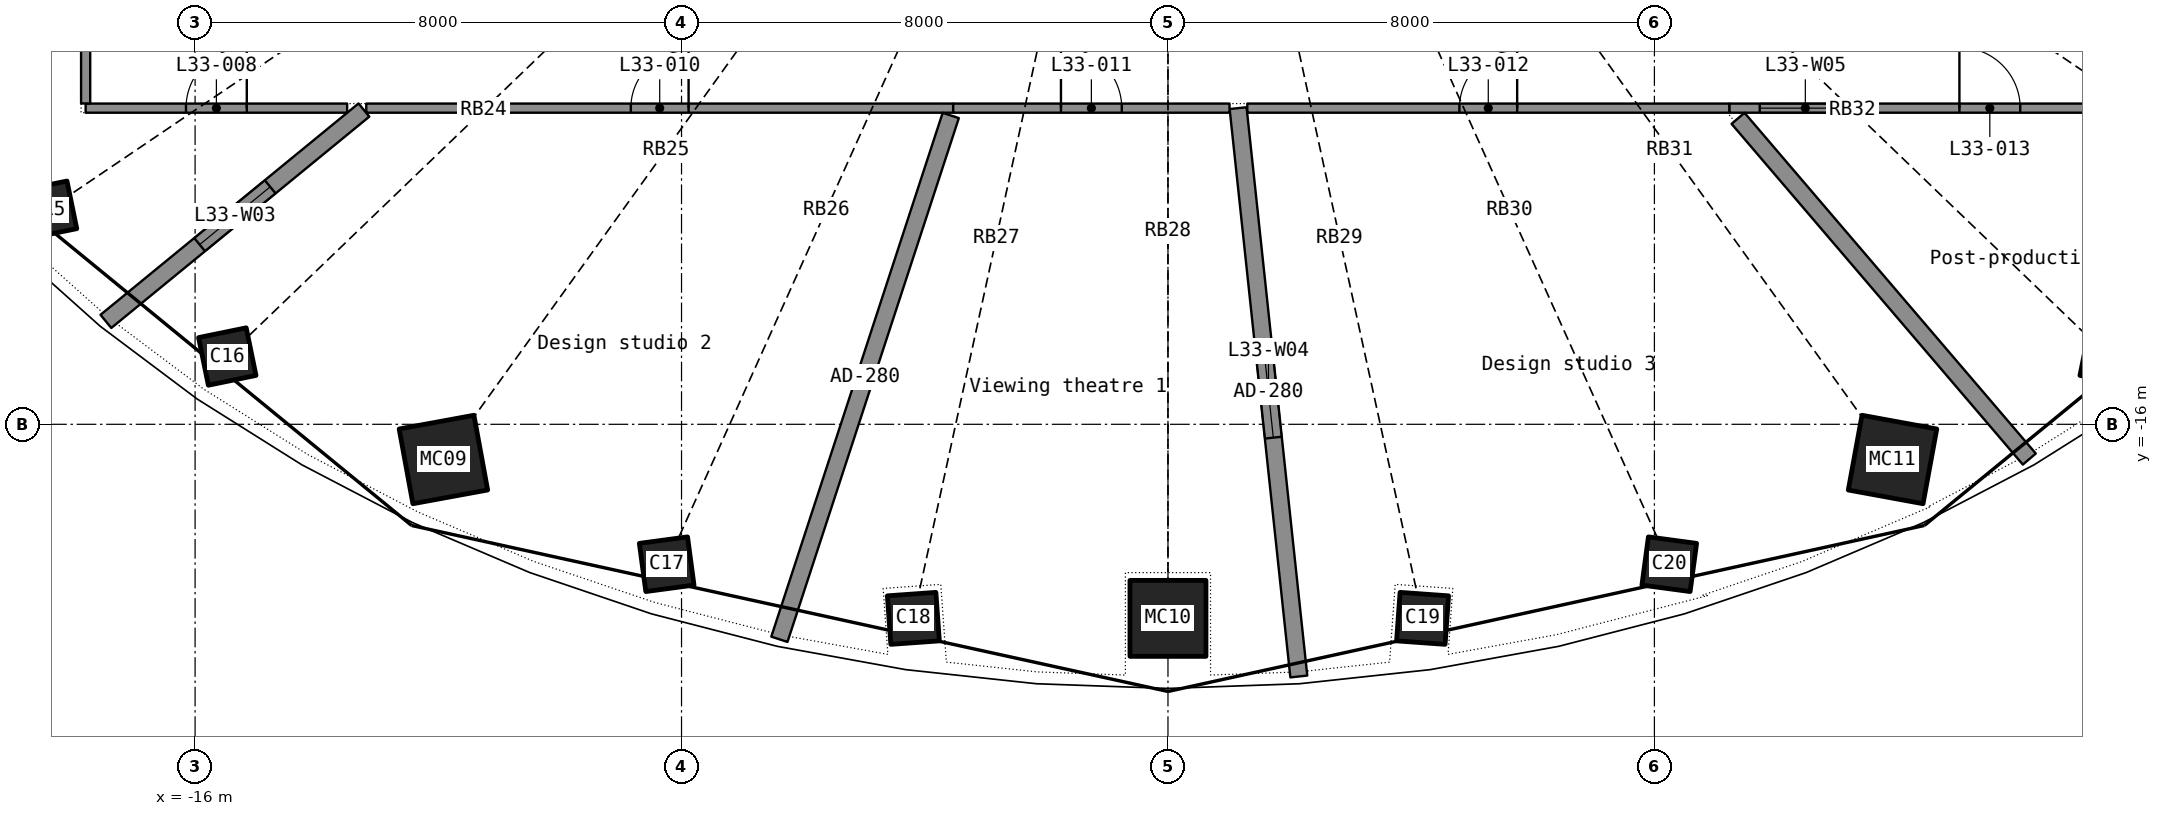
"""IFC4 building model, lengths in metres.
Left out: names, types, materials, properties, quantities, classifications, styles, units other than length and angle.
Written with IfcOpenShell. Run it as: python <this file> out.ifc"""

import sys

from ifc_helpers import new_model, si_unit, direction, frame, frame_2d, origin, origin_2d, place, context, subcontext, project, spatial, rectangle, hollow_rectangle, extrude, element, fill, save


model = new_model("IFC4")
c1 = context("Model", 3, precision=1e-05, world=origin(), true_north=direction((0.0, 1.0)))
c2 = subcontext(c1, "Body", "Model", "MODEL_VIEW")
j1 = project(units=[si_unit("LENGTHUNIT", "METRE"), si_unit("PLANEANGLEUNIT", "RADIAN")], contexts=[c1])
p1 = place(None, origin())
s1 = spatial("IfcSite", under=j1, at=p1, CompositionType="ELEMENT")
p2 = place(p1, origin())
s2 = spatial("IfcBuilding", under=s1, at=p2, CompositionType="ELEMENT")
p3 = place(p2, frame((0.0, 0.0, 137.8)))
s3 = spatial("IfcBuildingStorey", under=s2, at=p3, CompositionType="ELEMENT", Elevation=137.8)
p4 = place(p3, frame((-18.418, -12.471, 0.0), z_axis=(0.026446242, 0.018268352, 0.999483298), x_axis=(-0.721972796, 0.691891312, 0.00645709)))
e1 = element("IfcColumn", 1, at=p4, inside=s3, PredefinedType="COLUMN", context=c2, shape_type="SweptSolid", body=[
    extrude(hollow_rectangle(XDim=0.8, YDim=0.8, WallThickness=0.025, at=origin_2d()), origin(), (0.0, 0.0, 1.0), 3.702),
])
p5 = place(p3, frame((-15.471, -14.885, 0.0), z_axis=(0.022292076, 0.0216985, 0.999516002), x_axis=(-0.827314223, 0.561704567, 0.006257434)))
e2 = element("IfcColumn", 2, at=p5, inside=s3, PredefinedType="COLUMN", context=c2, shape_type="SweptSolid", body=[
    extrude(hollow_rectangle(XDim=0.8, YDim=0.8, WallThickness=0.025, at=origin_2d()), origin(), (0.0, 0.0, 1.0), 3.702),
])
p6 = place(p3, frame((-11.916, -16.579, 0.0), z_axis=(0.017280237, 0.024535299, 0.999549605), x_axis=(-0.908022718, 0.418885919, 0.005415796)))
e3 = element("IfcColumn", 3, at=p6, inside=s3, PredefinedType="COLUMN", context=c2, shape_type="SweptSolid", body=[
    extrude(hollow_rectangle(XDim=1.25, YDim=1.25, WallThickness=0.032, at=origin_2d()), origin(), (0.0, 0.0, 1.0), 3.702),
])
for number, where, z_axis, x_axis in (
    (4, (-8.244, -18.302, 0.0), (0.012, 0.027, 1.0), (-0.959, 0.282, 0.004)),
    (5, (-4.188, -19.192, 0.0), (0.006, 0.028, 1.0), (-0.99, 0.14, 0.002)),
):
    element("IfcColumn", number, at=place(p3, frame(where, z_axis=z_axis, x_axis=x_axis)), inside=s3, PredefinedType="COLUMN", context=c2, shape_type="SweptSolid", body=[
        extrude(hollow_rectangle(XDim=0.8, YDim=0.8, WallThickness=0.025, at=origin_2d()), origin(), (0.0, 0.0, 1.0), 3.701),
    ])
p7 = place(p3, frame((0.0, -19.192, 0.0), z_axis=(0.0, 0.02836206, 0.999597716), x_axis=(-1.0, 0.0, 0.0)))
e6 = element("IfcColumn", 6, at=p7, inside=s3, PredefinedType="COLUMN", context=c2, shape_type="SweptSolid", body=[
    extrude(hollow_rectangle(XDim=1.25, YDim=1.25, WallThickness=0.032, at=origin_2d()), origin(), (0.0, 0.0, 1.0), 3.701),
])
for number, where, z_axis, x_axis in (
    (7, (4.188, -19.192, 0.0), (-0.006, 0.028, 1.0), (-0.99, -0.14, -0.002)),
    (8, (8.244, -18.302, 0.0), (-0.012, 0.027, 1.0), (-0.959, -0.282, -0.004)),
):
    element("IfcColumn", number, at=place(p3, frame(where, z_axis=z_axis, x_axis=x_axis)), inside=s3, PredefinedType="COLUMN", context=c2, shape_type="SweptSolid", body=[
        extrude(hollow_rectangle(XDim=0.8, YDim=0.8, WallThickness=0.025, at=origin_2d()), origin(), (0.0, 0.0, 1.0), 3.701),
    ])
p8 = place(p3, frame((11.916, -16.579, 0.0), z_axis=(-0.017280237, 0.024535299, 0.999549605), x_axis=(-0.908022718, -0.418885919, -0.005415796)))
e9 = element("IfcColumn", 9, at=p8, inside=s3, PredefinedType="COLUMN", context=c2, shape_type="SweptSolid", body=[
    extrude(hollow_rectangle(XDim=1.25, YDim=1.25, WallThickness=0.032, at=origin_2d()), origin(), (0.0, 0.0, 1.0), 3.702),
])
p9 = place(p3, frame((15.471, -14.885, 0.0), z_axis=(-0.022292076, 0.0216985, 0.999516002), x_axis=(-0.827314223, -0.561704567, -0.006257434)))
e10 = element("IfcColumn", 10, at=p9, inside=s3, PredefinedType="COLUMN", context=c2, shape_type="SweptSolid", body=[
    extrude(hollow_rectangle(XDim=0.8, YDim=0.8, WallThickness=0.025, at=origin_2d()), origin(), (0.0, 0.0, 1.0), 3.702),
])
p10 = place(p3, frame((-13.185, -10.8, 0.0), z_axis=(0.0, 0.0, 1.0), x_axis=(1.0, 0.0, 0.0)))
e11 = element("IfcWall", 11, at=p10, inside=s3, PredefinedType="PARTITIONING", context=c2, shape_type="SweptSolid", body=[
    extrude(rectangle(XDim=9.652, YDim=0.15, at=frame_2d((4.826, 0.0))), origin(), (0.0, 0.0, 1.0), 2.4),
])
p11 = place(p10, frame((4.351, 0.0, 0.0)))
e12 = element("IfcOpeningElement", 12, at=p11, cuts=e11, PredefinedType="OPENING", context=c2, shape_type="SweptSolid", body=[
    extrude(rectangle(XDim=0.95, YDim=2.15, at=frame_2d((0.475, 1.075))), frame((0.0, 0.085, 0.0), z_axis=(0.0, -1.0, 0.0), x_axis=(1.0, 0.0, 0.0)), (0.0, 0.0, 1.0), 0.17),
])
p12 = place(p3, frame((2.152, -20.148, 0.0), z_axis=(0.0, 0.0, 1.0), x_axis=(-0.106217678, 0.994342901, 0.0)))
e13 = element("IfcWall", 13, at=p12, inside=s3, PredefinedType="PARTITIONING", context=c2, shape_type="SweptSolid", body=[
    extrude(rectangle(XDim=9.401, YDim=0.28, at=frame_2d((4.7, 0.0))), origin(), (0.0, 0.0, 1.0), 2.4),
])
p13 = place(p12, frame((3.95, 0.0, 1.0)))
e14 = element("IfcOpeningElement", 14, at=p13, cuts=e13, PredefinedType="OPENING", context=c2, shape_type="SweptSolid", body=[
    extrude(rectangle(XDim=1.5, YDim=1.2, at=frame_2d((0.75, 0.6))), frame((0.0, 0.15, 0.0), z_axis=(0.0, -1.0, 0.0), x_axis=(1.0, 0.0, 0.0)), (0.0, 0.0, 1.0), 0.3),
])
p14 = place(p3, frame((-6.391, -19.536, 0.0), z_axis=(0.0, 0.0, 1.0), x_axis=(0.310914325, 0.950437943, 0.0)))
e15 = element("IfcWall", 15, at=p14, inside=s3, PredefinedType="PARTITIONING", context=c2, shape_type="SweptSolid", body=[
    extrude(rectangle(XDim=9.065, YDim=0.28, at=frame_2d((4.532, 0.0))), origin(), (0.0, 0.0, 1.0), 2.4),
])
p15 = place(p3, frame((9.232, -10.8, 0.0), z_axis=(0.0, 0.0, 1.0), x_axis=(1.0, 0.0, 0.0)))
e16 = element("IfcWall", 16, at=p15, inside=s3, PredefinedType="PARTITIONING", context=c2, shape_type="SweptSolid", body=[
    extrude(rectangle(XDim=8.568, YDim=0.15, at=frame_2d((4.284, 0.0))), origin(), (0.0, 0.0, 1.0), 2.4),
])
p16 = place(p15, frame((3.784, 0.0, 0.0)))
e17 = element("IfcOpeningElement", 17, at=p16, cuts=e16, PredefinedType="OPENING", context=c2, shape_type="SweptSolid", body=[
    extrude(rectangle(XDim=1.0, YDim=2.2, at=frame_2d((0.5, 1.1))), frame((0.0, 0.085, 0.0), z_axis=(0.0, -1.0, 0.0), x_axis=(1.0, 0.0, 0.0)), (0.0, 0.0, 1.0), 0.17),
])
p17 = place(p15, frame((0.5, 0.0, 1.0)))
e18 = element("IfcOpeningElement", 18, at=p17, cuts=e16, PredefinedType="OPENING", context=c2, shape_type="SweptSolid", body=[
    extrude(rectangle(XDim=1.5, YDim=1.2, at=frame_2d((0.75, 0.6))), frame((0.0, 0.085, 0.0), z_axis=(0.0, -1.0, 0.0), x_axis=(1.0, 0.0, 0.0)), (0.0, 0.0, 1.0), 0.17),
])
p18 = place(p3, frame((1.304, -10.8, 0.0), z_axis=(0.0, 0.0, 1.0), x_axis=(1.0, 0.0, 0.0)))
e19 = element("IfcWall", 19, at=p18, inside=s3, PredefinedType="PARTITIONING", context=c2, shape_type="SweptSolid", body=[
    extrude(rectangle(XDim=7.927, YDim=0.15, at=frame_2d((3.963, 0.0))), origin(), (0.0, 0.0, 1.0), 2.4),
])
p19 = place(p18, frame((3.488, 0.0, 0.0)))
e20 = element("IfcOpeningElement", 20, at=p19, cuts=e19, PredefinedType="OPENING", context=c2, shape_type="SweptSolid", body=[
    extrude(rectangle(XDim=0.95, YDim=2.15, at=frame_2d((0.475, 1.075))), frame((0.0, 0.085, 0.0), z_axis=(0.0, -1.0, 0.0), x_axis=(1.0, 0.0, 0.0)), (0.0, 0.0, 1.0), 0.17),
])
p20 = place(p3, frame((14.166, -16.572, 0.0), z_axis=(0.0, 0.0, 1.0), x_axis=(-0.649781766, 0.760120817, 0.0)))
e21 = element("IfcWall", 21, at=p20, inside=s3, PredefinedType="PARTITIONING", context=c2, shape_type="SweptSolid", body=[
    extrude(rectangle(XDim=7.373, YDim=0.28, at=frame_2d((3.686, 0.0))), origin(), (0.0, 0.0, 1.0), 2.4),
])
p21 = place(p3, frame((-17.467, -14.307, 0.0), z_axis=(0.0, 0.0, 1.0), x_axis=(0.773600248, 0.633673935, 0.0)))
e22 = element("IfcWall", 22, at=p21, inside=s3, PredefinedType="PARTITIONING", context=c2, shape_type="SweptSolid", body=[
    extrude(rectangle(XDim=5.486, YDim=0.28, at=frame_2d((2.743, 0.0))), origin(), (0.0, 0.0, 1.0), 2.4),
])
p22 = place(p21, frame((1.993, 0.0, 1.0)))
e23 = element("IfcOpeningElement", 23, at=p22, cuts=e22, PredefinedType="OPENING", context=c2, shape_type="SweptSolid", body=[
    extrude(rectangle(XDim=1.5, YDim=1.2, at=frame_2d((0.75, 0.6))), frame((0.0, 0.15, 0.0), z_axis=(0.0, -1.0, 0.0), x_axis=(1.0, 0.0, 0.0)), (0.0, 0.0, 1.0), 0.3),
])
p23 = place(p3, frame((-3.532, -10.8, 0.0), z_axis=(0.0, 0.0, 1.0), x_axis=(1.0, 0.0, 0.0)))
e24 = element("IfcWall", 24, at=p23, inside=s3, PredefinedType="PARTITIONING", context=c2, shape_type="SweptSolid", body=[
    extrude(rectangle(XDim=4.544, YDim=0.15, at=frame_2d((2.272, 0.0))), origin(), (0.0, 0.0, 1.0), 2.4),
])
p24 = place(p23, frame((1.772, 0.0, 0.0)))
e25 = element("IfcOpeningElement", 25, at=p24, cuts=e24, PredefinedType="OPENING", context=c2, shape_type="SweptSolid", body=[
    extrude(rectangle(XDim=1.0, YDim=2.2, at=frame_2d((0.5, 1.1))), frame((0.0, 0.085, 0.0), z_axis=(0.0, -1.0, 0.0), x_axis=(1.0, 0.0, 0.0)), (0.0, 0.0, 1.0), 0.17),
])
p25 = place(p3, frame((-17.8, -10.8, 0.0), z_axis=(0.0, 0.0, 1.0), x_axis=(1.0, 0.0, 0.0)))
e26 = element("IfcWall", 26, at=p25, inside=s3, PredefinedType="PARTITIONING", context=c2, shape_type="SweptSolid", body=[
    extrude(rectangle(XDim=4.301, YDim=0.15, at=frame_2d((2.15, 0.0))), origin(), (0.0, 0.0, 1.0), 2.4),
])
p26 = place(p25, frame((1.65, 0.0, 0.0)))
e27 = element("IfcOpeningElement", 27, at=p26, cuts=e26, PredefinedType="OPENING", context=c2, shape_type="SweptSolid", body=[
    extrude(rectangle(XDim=1.0, YDim=2.2, at=frame_2d((0.5, 1.1))), frame((0.0, 0.085, 0.0), z_axis=(0.0, -1.0, 0.0), x_axis=(1.0, 0.0, 0.0)), (0.0, 0.0, 1.0), 0.17),
])
p27 = place(p3, frame((-17.8, -7.188, 0.0), z_axis=(0.0, 0.0, 1.0), x_axis=(0.0, -1.0, 0.0)))
e28 = element("IfcWall", 28, at=p27, inside=s3, PredefinedType="PARTITIONING", context=c2, shape_type="SweptSolid", body=[
    extrude(rectangle(XDim=3.535, YDim=0.15, at=frame_2d((1.768, 0.0))), origin(), (0.0, 0.0, 1.0), 2.4),
])
p28 = place(p26, origin())
e29 = element("IfcDoor", 29, at=p28, inside=s3, OperationType="SINGLE_SWING_RIGHT", PredefinedType="DOOR", context=c2, shape_type="SweptSolid", body=[
    extrude(rectangle(XDim=1.0, YDim=2.2, at=frame_2d((0.5, 1.1))), frame((0.0, 0.025, 0.0), z_axis=(0.0, -1.0, 0.0), x_axis=(1.0, 0.0, 0.0)), (0.0, 0.0, 1.0), 0.05),
])
fill(e27, e29)
p29 = place(p11, origin())
e30 = element("IfcDoor", 30, at=p29, inside=s3, OperationType="SINGLE_SWING_RIGHT", PredefinedType="DOOR", context=c2, shape_type="SweptSolid", body=[
    extrude(rectangle(XDim=0.95, YDim=2.15, at=frame_2d((0.475, 1.075))), frame((0.0, 0.025, 0.0), z_axis=(0.0, -1.0, 0.0), x_axis=(1.0, 0.0, 0.0)), (0.0, 0.0, 1.0), 0.05),
])
fill(e12, e30)
p30 = place(p24, origin())
e31 = element("IfcDoor", 31, at=p30, inside=s3, OperationType="SINGLE_SWING_LEFT", PredefinedType="DOOR", context=c2, shape_type="SweptSolid", body=[
    extrude(rectangle(XDim=1.0, YDim=2.2, at=frame_2d((0.5, 1.1))), frame((0.0, 0.025, 0.0), z_axis=(0.0, -1.0, 0.0), x_axis=(1.0, 0.0, 0.0)), (0.0, 0.0, 1.0), 0.05),
])
fill(e25, e31)
p31 = place(p19, origin())
e32 = element("IfcDoor", 32, at=p31, inside=s3, OperationType="SINGLE_SWING_RIGHT", PredefinedType="DOOR", context=c2, shape_type="SweptSolid", body=[
    extrude(rectangle(XDim=0.95, YDim=2.15, at=frame_2d((0.475, 1.075))), frame((0.0, 0.025, 0.0), z_axis=(0.0, -1.0, 0.0), x_axis=(1.0, 0.0, 0.0)), (0.0, 0.0, 1.0), 0.05),
])
fill(e20, e32)
p32 = place(p16, origin())
e33 = element("IfcDoor", 33, at=p32, inside=s3, OperationType="SINGLE_SWING_LEFT", PredefinedType="DOOR", context=c2, shape_type="SweptSolid", body=[
    extrude(rectangle(XDim=1.0, YDim=2.2, at=frame_2d((0.5, 1.1))), frame((0.0, 0.025, 0.0), z_axis=(0.0, -1.0, 0.0), x_axis=(1.0, 0.0, 0.0)), (0.0, 0.0, 1.0), 0.05),
])
fill(e17, e33)
p33 = place(p22, origin())
e34 = element("IfcWindow", 34, at=p33, inside=s3, PartitioningType="SINGLE_PANEL", PredefinedType="WINDOW", context=c2, shape_type="SweptSolid", body=[
    extrude(rectangle(XDim=1.5, YDim=1.2, at=frame_2d((0.75, 0.6))), frame((0.0, 0.03, 0.0), z_axis=(0.0, -1.0, 0.0), x_axis=(1.0, 0.0, 0.0)), (0.0, 0.0, 1.0), 0.06),
])
fill(e23, e34)
p34 = place(p13, origin())
e35 = element("IfcWindow", 35, at=p34, inside=s3, PartitioningType="SINGLE_PANEL", PredefinedType="WINDOW", context=c2, shape_type="SweptSolid", body=[
    extrude(rectangle(XDim=1.5, YDim=1.2, at=frame_2d((0.75, 0.6))), frame((0.0, 0.03, 0.0), z_axis=(0.0, -1.0, 0.0), x_axis=(1.0, 0.0, 0.0)), (0.0, 0.0, 1.0), 0.06),
])
fill(e14, e35)
p35 = place(p17, origin())
e36 = element("IfcWindow", 36, at=p35, inside=s3, PartitioningType="SINGLE_PANEL", PredefinedType="WINDOW", context=c2, shape_type="SweptSolid", body=[
    extrude(rectangle(XDim=1.5, YDim=1.2, at=frame_2d((0.75, 0.6))), frame((0.0, 0.03, 0.0), z_axis=(0.0, -1.0, 0.0), x_axis=(1.0, 0.0, 0.0)), (0.0, 0.0, 1.0), 0.06),
])
fill(e18, e36)
save(model, sys.argv[1])
